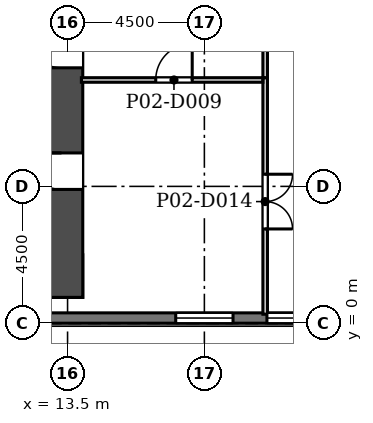
"""IFC4 building model, lengths in metres.
Left out: names, types, materials, properties, quantities, classifications, styles, units other than length and angle.
Written with IfcOpenShell. Run it as: python <this file> out.ifc"""

import sys

from ifc_helpers import new_model, si_unit, direction, frame, frame_2d, origin, place, context, subcontext, project, spatial, rectangle, extrude, element, fill, save


model = new_model("IFC4")
c1 = context("Model", 3, precision=1e-05, world=origin(), true_north=direction((0.0, 1.0)))
c2 = subcontext(c1, "Body", "Model", "MODEL_VIEW")
j1 = project(units=[si_unit("LENGTHUNIT", "METRE"), si_unit("PLANEANGLEUNIT", "RADIAN")], contexts=[c1])
p1 = place(None, origin())
s1 = spatial("IfcSite", under=j1, at=p1, CompositionType="ELEMENT")
p2 = place(p1, origin())
s2 = spatial("IfcBuilding", under=s1, at=p2, CompositionType="ELEMENT")
p3 = place(p2, frame((0.0, 0.0, 14.0)))
s3 = spatial("IfcBuildingStorey", under=s2, at=p3, CompositionType="ELEMENT", Elevation=14.0)
p4 = place(p3, frame((-14.0, 1.55, 0.0), z_axis=(0.0, 0.0, 1.0), x_axis=(1.0, 0.0, 0.0)))
e1 = element("IfcWall", 1, at=p4, inside=s3, PredefinedType="SHEAR", context=c2, shape_type="SweptSolid", body=[
    extrude(rectangle(XDim=28.0, YDim=1.4, at=frame_2d((14.0, 0.0))), origin(), (0.0, 0.0, 1.0), 6.0),
])
p5 = place(p3, frame((13.3, 0.85, 0.0), z_axis=(0.0, 0.0, 1.0), x_axis=(0.0, 1.0, 0.0)))
e2 = element("IfcWall", 2, at=p5, inside=s3, PredefinedType="SHEAR", context=c2, shape_type="SweptSolid", body=[
    extrude(rectangle(XDim=10.202, YDim=1.4, at=frame_2d((5.101, 0.0))), origin(), (0.0, 0.0, 1.0), 6.0),
])
p6 = place(p5, frame((3.55, 0.0, 0.0)))
e3 = element("IfcOpeningElement", 3, at=p6, cuts=e2, PredefinedType="OPENING", context=c2, shape_type="SweptSolid", body=[
    extrude(rectangle(XDim=1.2, YDim=2.1, at=frame_2d((0.6, 1.05))), frame((0.0, 0.71, 0.0), z_axis=(0.0, -1.0, 0.0), x_axis=(1.0, 0.0, 0.0)), (0.0, 0.0, 1.0), 1.42),
])
p7 = place(p5, frame((7.55, 0.0, 0.0)))
e4 = element("IfcOpeningElement", 4, at=p7, cuts=e2, PredefinedType="OPENING", context=c2, shape_type="SweptSolid", body=[
    extrude(rectangle(XDim=1.2, YDim=2.1, at=frame_2d((0.6, 1.05))), frame((0.0, 0.71, 0.0), z_axis=(0.0, -1.0, 0.0), x_axis=(1.0, 0.0, 0.0)), (0.0, 0.0, 1.0), 1.42),
])
p8 = place(p3, frame((-38.0, 0.17, 0.0), z_axis=(0.0, 0.0, 1.0), x_axis=(1.0, 0.0, 0.0)))
e5 = element("IfcWall", 5, at=p8, inside=s3, PredefinedType="SOLIDWALL", context=c2, shape_type="SweptSolid", body=[
    extrude(rectangle(XDim=76.0, YDim=0.34, at=frame_2d((38.0, 0.0))), origin(), (0.0, 0.0, 1.0), 5.7),
])
p9 = place(p8, frame((1.058, 0.0, 0.9)))
e6 = element("IfcOpeningElement", 6, at=p9, cuts=e5, PredefinedType="OPENING", context=c2, shape_type="SweptSolid", body=[
    extrude(rectangle(XDim=1.885, YDim=3.5, at=frame_2d((0.942, 1.75))), frame((0.0, 0.18, 0.0), z_axis=(0.0, -1.0, 0.0), x_axis=(1.0, 0.0, 0.0)), (0.0, 0.0, 1.0), 0.36),
])
p10 = place(p8, frame((4.058, 0.0, 0.9)))
e7 = element("IfcOpeningElement", 7, at=p10, cuts=e5, PredefinedType="OPENING", context=c2, shape_type="SweptSolid", body=[
    extrude(rectangle(XDim=1.885, YDim=3.5, at=frame_2d((0.942, 1.75))), frame((0.0, 0.18, 0.0), z_axis=(0.0, -1.0, 0.0), x_axis=(1.0, 0.0, 0.0)), (0.0, 0.0, 1.0), 0.36),
])
p11 = place(p8, frame((7.058, 0.0, 0.9)))
e8 = element("IfcOpeningElement", 8, at=p11, cuts=e5, PredefinedType="OPENING", context=c2, shape_type="SweptSolid", body=[
    extrude(rectangle(XDim=1.885, YDim=3.5, at=frame_2d((0.942, 1.75))), frame((0.0, 0.18, 0.0), z_axis=(0.0, -1.0, 0.0), x_axis=(1.0, 0.0, 0.0)), (0.0, 0.0, 1.0), 0.36),
])
p12 = place(p8, frame((10.058, 0.0, 0.9)))
e9 = element("IfcOpeningElement", 9, at=p12, cuts=e5, PredefinedType="OPENING", context=c2, shape_type="SweptSolid", body=[
    extrude(rectangle(XDim=1.885, YDim=3.5, at=frame_2d((0.942, 1.75))), frame((0.0, 0.18, 0.0), z_axis=(0.0, -1.0, 0.0), x_axis=(1.0, 0.0, 0.0)), (0.0, 0.0, 1.0), 0.36),
])
p13 = place(p8, frame((13.058, 0.0, 0.9)))
e10 = element("IfcOpeningElement", 10, at=p13, cuts=e5, PredefinedType="OPENING", context=c2, shape_type="SweptSolid", body=[
    extrude(rectangle(XDim=1.885, YDim=3.5, at=frame_2d((0.942, 1.75))), frame((0.0, 0.18, 0.0), z_axis=(0.0, -1.0, 0.0), x_axis=(1.0, 0.0, 0.0)), (0.0, 0.0, 1.0), 0.36),
])
p14 = place(p8, frame((16.058, 0.0, 0.9)))
e11 = element("IfcOpeningElement", 11, at=p14, cuts=e5, PredefinedType="OPENING", context=c2, shape_type="SweptSolid", body=[
    extrude(rectangle(XDim=1.885, YDim=3.5, at=frame_2d((0.942, 1.75))), frame((0.0, 0.18, 0.0), z_axis=(0.0, -1.0, 0.0), x_axis=(1.0, 0.0, 0.0)), (0.0, 0.0, 1.0), 0.36),
])
p15 = place(p8, frame((19.058, 0.0, 0.9)))
e12 = element("IfcOpeningElement", 12, at=p15, cuts=e5, PredefinedType="OPENING", context=c2, shape_type="SweptSolid", body=[
    extrude(rectangle(XDim=1.885, YDim=3.5, at=frame_2d((0.942, 1.75))), frame((0.0, 0.18, 0.0), z_axis=(0.0, -1.0, 0.0), x_axis=(1.0, 0.0, 0.0)), (0.0, 0.0, 1.0), 0.36),
])
p16 = place(p8, frame((55.058, 0.0, 0.9)))
e13 = element("IfcOpeningElement", 13, at=p16, cuts=e5, PredefinedType="OPENING", context=c2, shape_type="SweptSolid", body=[
    extrude(rectangle(XDim=1.885, YDim=3.5, at=frame_2d((0.942, 1.75))), frame((0.0, 0.18, 0.0), z_axis=(0.0, -1.0, 0.0), x_axis=(1.0, 0.0, 0.0)), (0.0, 0.0, 1.0), 0.36),
])
p17 = place(p8, frame((58.058, 0.0, 0.9)))
e14 = element("IfcOpeningElement", 14, at=p17, cuts=e5, PredefinedType="OPENING", context=c2, shape_type="SweptSolid", body=[
    extrude(rectangle(XDim=1.885, YDim=3.5, at=frame_2d((0.942, 1.75))), frame((0.0, 0.18, 0.0), z_axis=(0.0, -1.0, 0.0), x_axis=(1.0, 0.0, 0.0)), (0.0, 0.0, 1.0), 0.36),
])
p18 = place(p8, frame((61.058, 0.0, 0.9)))
e15 = element("IfcOpeningElement", 15, at=p18, cuts=e5, PredefinedType="OPENING", context=c2, shape_type="SweptSolid", body=[
    extrude(rectangle(XDim=1.885, YDim=3.5, at=frame_2d((0.942, 1.75))), frame((0.0, 0.18, 0.0), z_axis=(0.0, -1.0, 0.0), x_axis=(1.0, 0.0, 0.0)), (0.0, 0.0, 1.0), 0.36),
])
p19 = place(p8, frame((64.058, 0.0, 0.9)))
e16 = element("IfcOpeningElement", 16, at=p19, cuts=e5, PredefinedType="OPENING", context=c2, shape_type="SweptSolid", body=[
    extrude(rectangle(XDim=1.885, YDim=3.5, at=frame_2d((0.942, 1.75))), frame((0.0, 0.18, 0.0), z_axis=(0.0, -1.0, 0.0), x_axis=(1.0, 0.0, 0.0)), (0.0, 0.0, 1.0), 0.36),
])
p20 = place(p8, frame((67.058, 0.0, 0.9)))
e17 = element("IfcOpeningElement", 17, at=p20, cuts=e5, PredefinedType="OPENING", context=c2, shape_type="SweptSolid", body=[
    extrude(rectangle(XDim=1.885, YDim=3.5, at=frame_2d((0.942, 1.75))), frame((0.0, 0.18, 0.0), z_axis=(0.0, -1.0, 0.0), x_axis=(1.0, 0.0, 0.0)), (0.0, 0.0, 1.0), 0.36),
])
p21 = place(p8, frame((70.058, 0.0, 0.9)))
e18 = element("IfcOpeningElement", 18, at=p21, cuts=e5, PredefinedType="OPENING", context=c2, shape_type="SweptSolid", body=[
    extrude(rectangle(XDim=1.885, YDim=3.5, at=frame_2d((0.942, 1.75))), frame((0.0, 0.18, 0.0), z_axis=(0.0, -1.0, 0.0), x_axis=(1.0, 0.0, 0.0)), (0.0, 0.0, 1.0), 0.36),
])
p22 = place(p8, frame((73.058, 0.0, 0.9)))
e19 = element("IfcOpeningElement", 19, at=p22, cuts=e5, PredefinedType="OPENING", context=c2, shape_type="SweptSolid", body=[
    extrude(rectangle(XDim=1.885, YDim=3.5, at=frame_2d((0.942, 1.75))), frame((0.0, 0.18, 0.0), z_axis=(0.0, -1.0, 0.0), x_axis=(1.0, 0.0, 0.0)), (0.0, 0.0, 1.0), 0.36),
])
p23 = place(p3, frame((42.853, 8.575, 0.0), z_axis=(0.0, 0.0, 1.0), x_axis=(-0.49999894854, 0.866026010844, 0.0)))
e20 = element("IfcWall", 20, at=p23, inside=s3, PredefinedType="SOLIDWALL", context=c2, shape_type="SweptSolid", body=[
    extrude(rectangle(XDim=76.0, YDim=0.34, at=frame_2d((38.0, 0.0))), origin(), (0.0, 0.0, 1.0), 5.7),
])
p24 = place(p23, frame((1.058, 0.0, 0.9)))
e21 = element("IfcOpeningElement", 21, at=p24, cuts=e20, PredefinedType="OPENING", context=c2, shape_type="SweptSolid", body=[
    extrude(rectangle(XDim=1.885, YDim=3.5, at=frame_2d((0.942, 1.75))), frame((0.0, 0.18, 0.0), z_axis=(0.0, -1.0, 0.0), x_axis=(1.0, 0.0, 0.0)), (0.0, 0.0, 1.0), 0.36),
])
p25 = place(p23, frame((4.058, 0.0, 0.9)))
e22 = element("IfcOpeningElement", 22, at=p25, cuts=e20, PredefinedType="OPENING", context=c2, shape_type="SweptSolid", body=[
    extrude(rectangle(XDim=1.885, YDim=3.5, at=frame_2d((0.942, 1.75))), frame((0.0, 0.18, 0.0), z_axis=(0.0, -1.0, 0.0), x_axis=(1.0, 0.0, 0.0)), (0.0, 0.0, 1.0), 0.36),
])
p26 = place(p23, frame((7.058, 0.0, 0.9)))
e23 = element("IfcOpeningElement", 23, at=p26, cuts=e20, PredefinedType="OPENING", context=c2, shape_type="SweptSolid", body=[
    extrude(rectangle(XDim=1.885, YDim=3.5, at=frame_2d((0.942, 1.75))), frame((0.0, 0.18, 0.0), z_axis=(0.0, -1.0, 0.0), x_axis=(1.0, 0.0, 0.0)), (0.0, 0.0, 1.0), 0.36),
])
p27 = place(p23, frame((10.058, 0.0, 0.9)))
e24 = element("IfcOpeningElement", 24, at=p27, cuts=e20, PredefinedType="OPENING", context=c2, shape_type="SweptSolid", body=[
    extrude(rectangle(XDim=1.885, YDim=3.5, at=frame_2d((0.942, 1.75))), frame((0.0, 0.18, 0.0), z_axis=(0.0, -1.0, 0.0), x_axis=(1.0, 0.0, 0.0)), (0.0, 0.0, 1.0), 0.36),
])
p28 = place(p23, frame((13.058, 0.0, 0.9)))
e25 = element("IfcOpeningElement", 25, at=p28, cuts=e20, PredefinedType="OPENING", context=c2, shape_type="SweptSolid", body=[
    extrude(rectangle(XDim=1.885, YDim=3.5, at=frame_2d((0.942, 1.75))), frame((0.0, 0.18, 0.0), z_axis=(0.0, -1.0, 0.0), x_axis=(1.0, 0.0, 0.0)), (0.0, 0.0, 1.0), 0.36),
])
p29 = place(p23, frame((16.058, 0.0, 0.9)))
e26 = element("IfcOpeningElement", 26, at=p29, cuts=e20, PredefinedType="OPENING", context=c2, shape_type="SweptSolid", body=[
    extrude(rectangle(XDim=1.885, YDim=3.5, at=frame_2d((0.942, 1.75))), frame((0.0, 0.18, 0.0), z_axis=(0.0, -1.0, 0.0), x_axis=(1.0, 0.0, 0.0)), (0.0, 0.0, 1.0), 0.36),
])
p30 = place(p23, frame((19.058, 0.0, 0.9)))
e27 = element("IfcOpeningElement", 27, at=p30, cuts=e20, PredefinedType="OPENING", context=c2, shape_type="SweptSolid", body=[
    extrude(rectangle(XDim=1.885, YDim=3.5, at=frame_2d((0.942, 1.75))), frame((0.0, 0.18, 0.0), z_axis=(0.0, -1.0, 0.0), x_axis=(1.0, 0.0, 0.0)), (0.0, 0.0, 1.0), 0.36),
])
p31 = place(p23, frame((22.058, 0.0, 0.9)))
e28 = element("IfcOpeningElement", 28, at=p31, cuts=e20, PredefinedType="OPENING", context=c2, shape_type="SweptSolid", body=[
    extrude(rectangle(XDim=1.885, YDim=3.5, at=frame_2d((0.942, 1.75))), frame((0.0, 0.18, 0.0), z_axis=(0.0, -1.0, 0.0), x_axis=(1.0, 0.0, 0.0)), (0.0, 0.0, 1.0), 0.36),
])
p32 = place(p23, frame((25.058, 0.0, 0.9)))
e29 = element("IfcOpeningElement", 29, at=p32, cuts=e20, PredefinedType="OPENING", context=c2, shape_type="SweptSolid", body=[
    extrude(rectangle(XDim=1.885, YDim=3.5, at=frame_2d((0.942, 1.75))), frame((0.0, 0.18, 0.0), z_axis=(0.0, -1.0, 0.0), x_axis=(1.0, 0.0, 0.0)), (0.0, 0.0, 1.0), 0.36),
])
p33 = place(p23, frame((28.058, 0.0, 0.9)))
e30 = element("IfcOpeningElement", 30, at=p33, cuts=e20, PredefinedType="OPENING", context=c2, shape_type="SweptSolid", body=[
    extrude(rectangle(XDim=1.885, YDim=3.5, at=frame_2d((0.942, 1.75))), frame((0.0, 0.18, 0.0), z_axis=(0.0, -1.0, 0.0), x_axis=(1.0, 0.0, 0.0)), (0.0, 0.0, 1.0), 0.36),
])
p34 = place(p23, frame((31.058, 0.0, 0.9)))
e31 = element("IfcOpeningElement", 31, at=p34, cuts=e20, PredefinedType="OPENING", context=c2, shape_type="SweptSolid", body=[
    extrude(rectangle(XDim=1.885, YDim=3.5, at=frame_2d((0.942, 1.75))), frame((0.0, 0.18, 0.0), z_axis=(0.0, -1.0, 0.0), x_axis=(1.0, 0.0, 0.0)), (0.0, 0.0, 1.0), 0.36),
])
p35 = place(p23, frame((34.058, 0.0, 0.9)))
e32 = element("IfcOpeningElement", 32, at=p35, cuts=e20, PredefinedType="OPENING", context=c2, shape_type="SweptSolid", body=[
    extrude(rectangle(XDim=1.885, YDim=3.5, at=frame_2d((0.942, 1.75))), frame((0.0, 0.18, 0.0), z_axis=(0.0, -1.0, 0.0), x_axis=(1.0, 0.0, 0.0)), (0.0, 0.0, 1.0), 0.36),
])
p36 = place(p23, frame((37.058, 0.0, 0.9)))
e33 = element("IfcOpeningElement", 33, at=p36, cuts=e20, PredefinedType="OPENING", context=c2, shape_type="SweptSolid", body=[
    extrude(rectangle(XDim=1.885, YDim=3.5, at=frame_2d((0.942, 1.75))), frame((0.0, 0.18, 0.0), z_axis=(0.0, -1.0, 0.0), x_axis=(1.0, 0.0, 0.0)), (0.0, 0.0, 1.0), 0.36),
])
p37 = place(p23, frame((40.058, 0.0, 0.9)))
e34 = element("IfcOpeningElement", 34, at=p37, cuts=e20, PredefinedType="OPENING", context=c2, shape_type="SweptSolid", body=[
    extrude(rectangle(XDim=1.885, YDim=3.5, at=frame_2d((0.942, 1.75))), frame((0.0, 0.18, 0.0), z_axis=(0.0, -1.0, 0.0), x_axis=(1.0, 0.0, 0.0)), (0.0, 0.0, 1.0), 0.36),
])
p38 = place(p23, frame((43.058, 0.0, 0.9)))
e35 = element("IfcOpeningElement", 35, at=p38, cuts=e20, PredefinedType="OPENING", context=c2, shape_type="SweptSolid", body=[
    extrude(rectangle(XDim=1.885, YDim=3.5, at=frame_2d((0.942, 1.75))), frame((0.0, 0.18, 0.0), z_axis=(0.0, -1.0, 0.0), x_axis=(1.0, 0.0, 0.0)), (0.0, 0.0, 1.0), 0.36),
])
p39 = place(p23, frame((46.058, 0.0, 0.9)))
e36 = element("IfcOpeningElement", 36, at=p39, cuts=e20, PredefinedType="OPENING", context=c2, shape_type="SweptSolid", body=[
    extrude(rectangle(XDim=1.885, YDim=3.5, at=frame_2d((0.942, 1.75))), frame((0.0, 0.18, 0.0), z_axis=(0.0, -1.0, 0.0), x_axis=(1.0, 0.0, 0.0)), (0.0, 0.0, 1.0), 0.36),
])
p40 = place(p23, frame((49.058, 0.0, 0.9)))
e37 = element("IfcOpeningElement", 37, at=p40, cuts=e20, PredefinedType="OPENING", context=c2, shape_type="SweptSolid", body=[
    extrude(rectangle(XDim=1.885, YDim=3.5, at=frame_2d((0.942, 1.75))), frame((0.0, 0.18, 0.0), z_axis=(0.0, -1.0, 0.0), x_axis=(1.0, 0.0, 0.0)), (0.0, 0.0, 1.0), 0.36),
])
p41 = place(p23, frame((52.058, 0.0, 0.9)))
e38 = element("IfcOpeningElement", 38, at=p41, cuts=e20, PredefinedType="OPENING", context=c2, shape_type="SweptSolid", body=[
    extrude(rectangle(XDim=1.885, YDim=3.5, at=frame_2d((0.942, 1.75))), frame((0.0, 0.18, 0.0), z_axis=(0.0, -1.0, 0.0), x_axis=(1.0, 0.0, 0.0)), (0.0, 0.0, 1.0), 0.36),
])
p42 = place(p23, frame((55.058, 0.0, 0.9)))
e39 = element("IfcOpeningElement", 39, at=p42, cuts=e20, PredefinedType="OPENING", context=c2, shape_type="SweptSolid", body=[
    extrude(rectangle(XDim=1.885, YDim=3.5, at=frame_2d((0.942, 1.75))), frame((0.0, 0.18, 0.0), z_axis=(0.0, -1.0, 0.0), x_axis=(1.0, 0.0, 0.0)), (0.0, 0.0, 1.0), 0.36),
])
p43 = place(p23, frame((58.058, 0.0, 0.9)))
e40 = element("IfcOpeningElement", 40, at=p43, cuts=e20, PredefinedType="OPENING", context=c2, shape_type="SweptSolid", body=[
    extrude(rectangle(XDim=1.885, YDim=3.5, at=frame_2d((0.942, 1.75))), frame((0.0, 0.18, 0.0), z_axis=(0.0, -1.0, 0.0), x_axis=(1.0, 0.0, 0.0)), (0.0, 0.0, 1.0), 0.36),
])
p44 = place(p23, frame((61.058, 0.0, 0.9)))
e41 = element("IfcOpeningElement", 41, at=p44, cuts=e20, PredefinedType="OPENING", context=c2, shape_type="SweptSolid", body=[
    extrude(rectangle(XDim=1.885, YDim=3.5, at=frame_2d((0.942, 1.75))), frame((0.0, 0.18, 0.0), z_axis=(0.0, -1.0, 0.0), x_axis=(1.0, 0.0, 0.0)), (0.0, 0.0, 1.0), 0.36),
])
p45 = place(p23, frame((64.058, 0.0, 0.9)))
e42 = element("IfcOpeningElement", 42, at=p45, cuts=e20, PredefinedType="OPENING", context=c2, shape_type="SweptSolid", body=[
    extrude(rectangle(XDim=1.885, YDim=3.5, at=frame_2d((0.942, 1.75))), frame((0.0, 0.18, 0.0), z_axis=(0.0, -1.0, 0.0), x_axis=(1.0, 0.0, 0.0)), (0.0, 0.0, 1.0), 0.36),
])
p46 = place(p23, frame((67.058, 0.0, 0.9)))
e43 = element("IfcOpeningElement", 43, at=p46, cuts=e20, PredefinedType="OPENING", context=c2, shape_type="SweptSolid", body=[
    extrude(rectangle(XDim=1.885, YDim=3.5, at=frame_2d((0.942, 1.75))), frame((0.0, 0.18, 0.0), z_axis=(0.0, -1.0, 0.0), x_axis=(1.0, 0.0, 0.0)), (0.0, 0.0, 1.0), 0.36),
])
p47 = place(p23, frame((70.058, 0.0, 0.9)))
e44 = element("IfcOpeningElement", 44, at=p47, cuts=e20, PredefinedType="OPENING", context=c2, shape_type="SweptSolid", body=[
    extrude(rectangle(XDim=1.885, YDim=3.5, at=frame_2d((0.942, 1.75))), frame((0.0, 0.18, 0.0), z_axis=(0.0, -1.0, 0.0), x_axis=(1.0, 0.0, 0.0)), (0.0, 0.0, 1.0), 0.36),
])
p48 = place(p23, frame((73.058, 0.0, 0.9)))
e45 = element("IfcOpeningElement", 45, at=p48, cuts=e20, PredefinedType="OPENING", context=c2, shape_type="SweptSolid", body=[
    extrude(rectangle(XDim=1.885, YDim=3.5, at=frame_2d((0.942, 1.75))), frame((0.0, 0.18, 0.0), z_axis=(0.0, -1.0, 0.0), x_axis=(1.0, 0.0, 0.0)), (0.0, 0.0, 1.0), 0.36),
])
p49 = place(p3, frame((20.0, 0.295, 0.0), z_axis=(0.0, 0.0, 1.0), x_axis=(0.0, 1.0, 0.0)))
e46 = element("IfcWall", 46, at=p49, inside=s3, PredefinedType="PARTITIONING", context=c2, shape_type="SweptSolid", body=[
    extrude(rectangle(XDim=7.78, YDim=0.15, at=frame_2d((3.89, 0.0))), origin(), (0.0, 0.0, 1.0), 5.7),
])
p50 = place(p49, frame((2.805, 0.0, 0.0)))
e47 = element("IfcOpeningElement", 47, at=p50, cuts=e46, PredefinedType="OPENING", context=c2, shape_type="SweptSolid", body=[
    extrude(rectangle(XDim=1.8, YDim=2.1, at=frame_2d((0.9, 1.05))), frame((0.0, 0.085, 0.0), z_axis=(0.0, -1.0, 0.0), x_axis=(1.0, 0.0, 0.0)), (0.0, 0.0, 1.0), 0.17),
])
p51 = place(p3, frame((13.955, 8.0, 0.0), z_axis=(0.0, 0.0, 1.0), x_axis=(1.0, 0.0, 0.0)))
e48 = element("IfcWall", 48, at=p51, inside=s3, PredefinedType="PARTITIONING", context=c2, shape_type="SweptSolid", body=[
    extrude(rectangle(XDim=5.97, YDim=0.15, at=frame_2d((2.985, 0.0))), origin(), (0.0, 0.0, 1.0), 5.7),
])
p52 = place(p51, frame((2.445, 0.0, 0.0)))
e49 = element("IfcOpeningElement", 49, at=p52, cuts=e48, PredefinedType="OPENING", context=c2, shape_type="SweptSolid", body=[
    extrude(rectangle(XDim=1.2, YDim=2.1, at=frame_2d((0.6, 1.05))), frame((0.0, 0.085, 0.0), z_axis=(0.0, -1.0, 0.0), x_axis=(1.0, 0.0, 0.0)), (0.0, 0.0, 1.0), 0.17),
])
p53 = place(p3, frame((20.0, 8.075, 0.0), z_axis=(0.0, 0.0, 1.0), x_axis=(0.0, 1.0, 0.0)))
e50 = element("IfcWall", 50, at=p53, inside=s3, PredefinedType="PARTITIONING", context=c2, shape_type="SweptSolid", body=[
    extrude(rectangle(XDim=1.85, YDim=0.15, at=frame_2d((0.925, 0.0))), origin(), (0.0, 0.0, 1.0), 5.7),
])
p54 = place(p16, origin())
e51 = element("IfcWindow", 51, at=p54, inside=s3, PartitioningType="SINGLE_PANEL", PredefinedType="WINDOW", context=c2, shape_type="SweptSolid", body=[
    extrude(rectangle(XDim=1.885, YDim=3.5, at=frame_2d((0.942, 1.75))), frame((0.0, 0.11, 0.0), z_axis=(0.0, -1.0, 0.0), x_axis=(1.0, 0.0, 0.0)), (0.0, 0.0, 1.0), 0.06),
])
fill(e13, e51)
p55 = place(p17, origin())
e52 = element("IfcWindow", 52, at=p55, inside=s3, PartitioningType="SINGLE_PANEL", PredefinedType="WINDOW", context=c2, shape_type="SweptSolid", body=[
    extrude(rectangle(XDim=1.885, YDim=3.5, at=frame_2d((0.942, 1.75))), frame((0.0, 0.11, 0.0), z_axis=(0.0, -1.0, 0.0), x_axis=(1.0, 0.0, 0.0)), (0.0, 0.0, 1.0), 0.06),
])
fill(e14, e52)
p56 = place(p6, origin())
e53 = element("IfcDoor", 53, at=p56, inside=s3, OperationType="SINGLE_SWING_RIGHT", PredefinedType="DOOR", context=c2, shape_type="SweptSolid", body=[
    extrude(rectangle(XDim=1.2, YDim=2.1, at=frame_2d((0.6, 1.05))), frame((0.0, 0.025, 0.0), z_axis=(0.0, -1.0, 0.0), x_axis=(1.0, 0.0, 0.0)), (0.0, 0.0, 1.0), 0.05),
])
fill(e3, e53)
p57 = place(p7, origin())
e54 = element("IfcDoor", 54, at=p57, inside=s3, OperationType="SINGLE_SWING_RIGHT", PredefinedType="DOOR", context=c2, shape_type="SweptSolid", body=[
    extrude(rectangle(XDim=1.2, YDim=2.1, at=frame_2d((0.6, 1.05))), frame((0.0, 0.025, 0.0), z_axis=(0.0, -1.0, 0.0), x_axis=(1.0, 0.0, 0.0)), (0.0, 0.0, 1.0), 0.05),
])
fill(e4, e54)
p58 = place(p52, origin())
e55 = element("IfcDoor", 55, at=p58, inside=s3, OperationType="SINGLE_SWING_RIGHT", PredefinedType="DOOR", context=c2, shape_type="SweptSolid", body=[
    extrude(rectangle(XDim=1.2, YDim=2.1, at=frame_2d((0.6, 1.05))), frame((0.0, 0.025, 0.0), z_axis=(0.0, -1.0, 0.0), x_axis=(1.0, 0.0, 0.0)), (0.0, 0.0, 1.0), 0.05),
])
fill(e49, e55)
p59 = place(p50, frame((1.8, 0.0, 0.0), z_axis=(0.0, 0.0, 1.0), x_axis=(-1.0, 0.0, 0.0)))
e56 = element("IfcDoor", 56, at=p59, inside=s3, OperationType="DOUBLE_DOOR_SINGLE_SWING", PredefinedType="DOOR", context=c2, shape_type="SweptSolid", body=[
    extrude(rectangle(XDim=1.8, YDim=2.1, at=frame_2d((0.9, 1.05))), frame((0.0, 0.025, 0.0), z_axis=(0.0, -1.0, 0.0), x_axis=(1.0, 0.0, 0.0)), (0.0, 0.0, 1.0), 0.05),
])
fill(e47, e56)
save(model, sys.argv[1])
